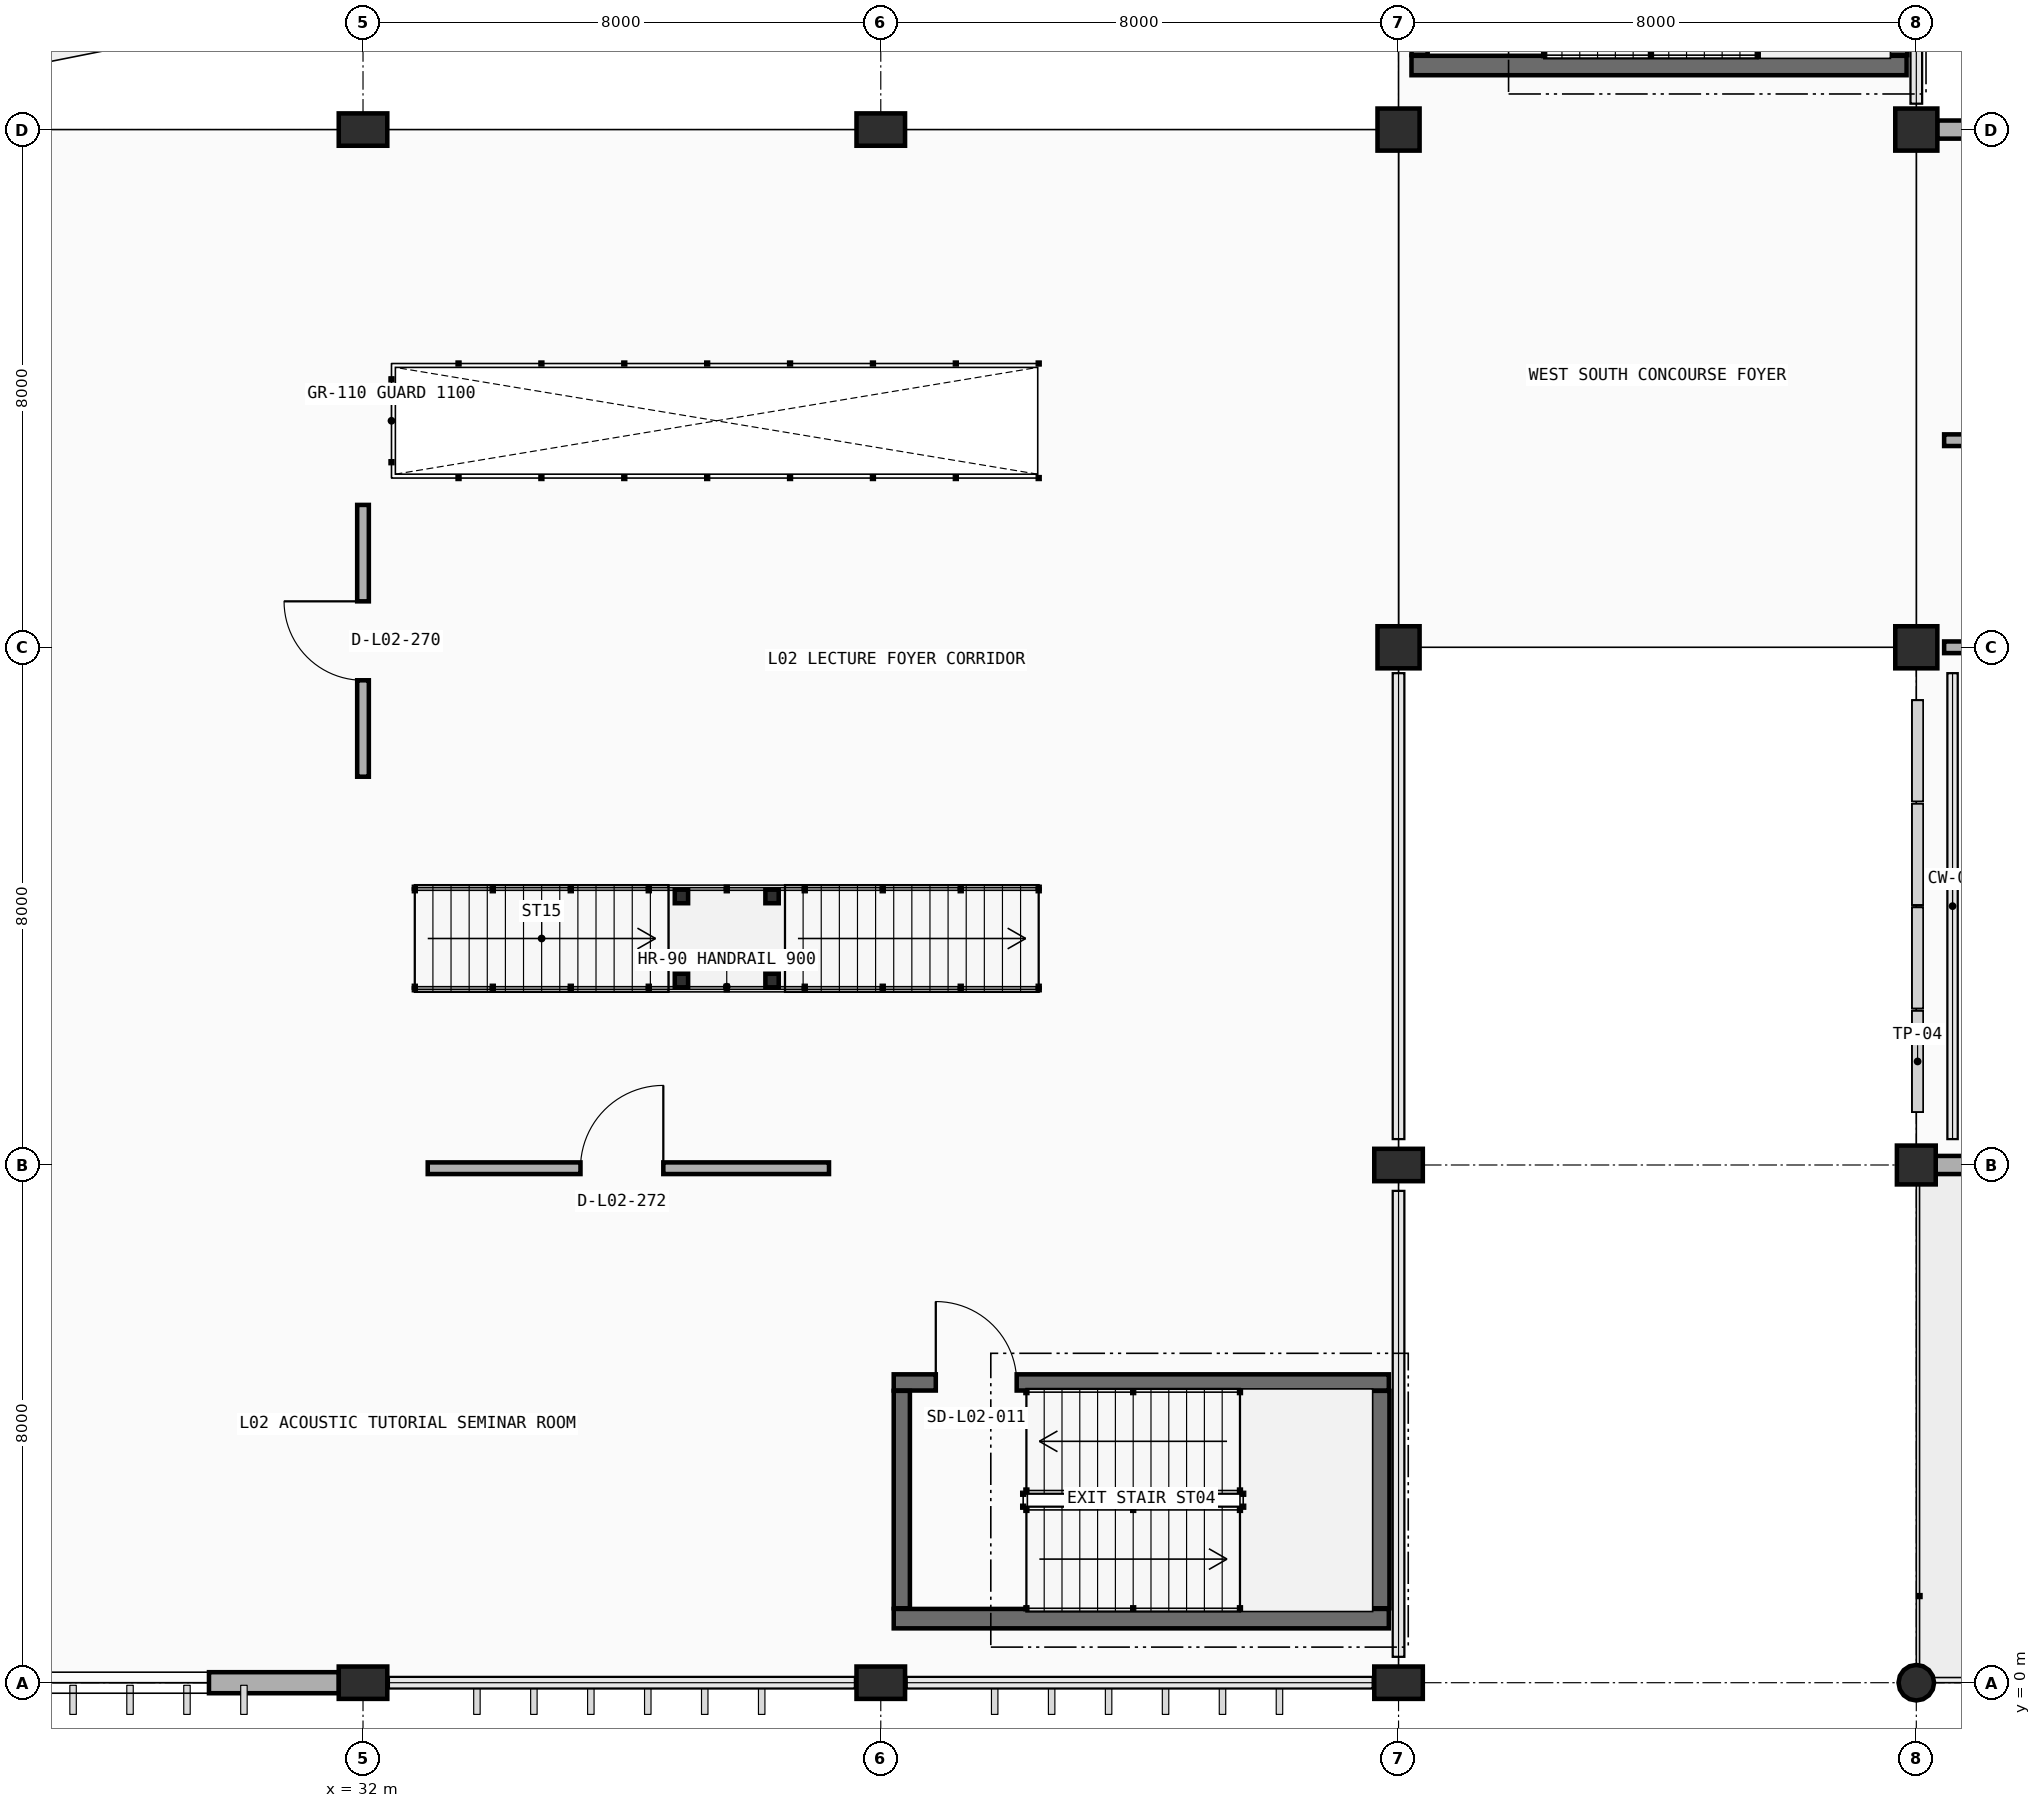
"""IFC4 building model, lengths in metres.
Left out: names, types, materials, properties, quantities, classifications, styles, units other than length and angle.
Written with IfcOpenShell. Run it as: python <this file> out.ifc"""

import sys

from ifc_helpers import new_model, si_unit, direction, frame, frame_2d, origin, origin_2d, place, context, subcontext, project, spatial, rectangle, circle, i_section, extrude, element, fill, save


model = new_model("IFC4")
c1 = context("Model", 3, precision=1e-05, world=origin(), true_north=direction((0.0, 1.0)))
c2 = subcontext(c1, "Body", "Model", "MODEL_VIEW")
j1 = project(units=[si_unit("LENGTHUNIT", "METRE"), si_unit("PLANEANGLEUNIT", "RADIAN")], contexts=[c1])
p1 = place(None, origin())
s1 = spatial("IfcSite", under=j1, at=p1, CompositionType="ELEMENT")
p2 = place(p1, origin())
s2 = spatial("IfcBuilding", under=s1, at=p2, CompositionType="ELEMENT")
p3 = place(p2, frame((0.0, 0.0, 4.8)))
s3 = spatial("IfcBuildingStorey", under=s2, at=p3, CompositionType="ELEMENT", Elevation=4.8)
for number, where, z_axis, x_axis in (
    (1, (32.0, 0.0, 0.0), (0.0, 0.0, 1.0), (0.0, 1.0, 0.0)),
    (2, (40.0, 0.0, 0.0), (0.0, 0.0, 1.0), (0.0, 1.0, 0.0)),
    (3, (48.0, 0.0, 0.0), (0.0, 0.0, 1.0), (0.0, 1.0, 0.0)),
):
    element("IfcColumn", number, at=place(p3, frame(where, z_axis=z_axis, x_axis=x_axis)), inside=s3, PredefinedType="COLUMN", context=c2, shape_type="SweptSolid", body=[
        extrude(rectangle(XDim=0.5, YDim=0.75, at=origin_2d()), origin(), (0.0, 0.0, 1.0), 4.8),
    ])
p4 = place(p3, frame((56.0, 0.0, 0.0), z_axis=(0.0, 0.0, 1.0), x_axis=(1.0, 0.0, 0.0)))
e4 = element("IfcColumn", 4, at=p4, inside=s3, PredefinedType="PILASTER", context=c2, shape_type="SweptSolid", body=[
    extrude(circle(Radius=0.275, at=origin_2d()), origin(), (0.0, 0.0, 1.0), 4.8),
])
p5 = place(p3, frame((48.0, 8.0, 0.0), z_axis=(0.0, 0.0, 1.0), x_axis=(0.0, 1.0, 0.0)))
e5 = element("IfcColumn", 5, at=p5, inside=s3, PredefinedType="COLUMN", context=c2, shape_type="SweptSolid", body=[
    extrude(rectangle(XDim=0.5, YDim=0.75, at=origin_2d()), origin(), (0.0, 0.0, 1.0), 4.8),
])
p6 = place(p3, frame((56.0, 8.0, 0.0), z_axis=(0.0, 0.0, 1.0), x_axis=(1.0, 0.0, 0.0)))
e6 = element("IfcColumn", 6, at=p6, inside=s3, PredefinedType="COLUMN", context=c2, shape_type="SweptSolid", body=[
    extrude(rectangle(XDim=0.6, YDim=0.6, at=origin_2d()), origin(), (0.0, 0.0, 1.0), 4.8),
])
for number, where, z_axis, x_axis in (
    (7, (48.0, 16.0, 0.0), (0.0, 0.0, 1.0), (1.0, 0.0, 0.0)),
    (8, (56.0, 16.0, 0.0), (0.0, 0.0, 1.0), (1.0, 0.0, 0.0)),
):
    element("IfcColumn", number, at=place(p3, frame(where, z_axis=z_axis, x_axis=x_axis)), inside=s3, PredefinedType="COLUMN", context=c2, shape_type="SweptSolid", body=[
        extrude(rectangle(XDim=0.65, YDim=0.65, at=origin_2d()), origin(), (0.0, 0.0, 1.0), 4.8),
    ])
for number, where, z_axis, x_axis in (
    (9, (32.0, 24.0, 0.0), (0.0, 0.0, 1.0), (0.0, 1.0, 0.0)),
    (10, (40.0, 24.0, 0.0), (0.0, 0.0, 1.0), (0.0, 1.0, 0.0)),
):
    element("IfcColumn", number, at=place(p3, frame(where, z_axis=z_axis, x_axis=x_axis)), inside=s3, PredefinedType="COLUMN", context=c2, shape_type="SweptSolid", body=[
        extrude(rectangle(XDim=0.5, YDim=0.75, at=origin_2d()), origin(), (0.0, 0.0, 1.0), 4.8),
    ])
for number, where, z_axis, x_axis in (
    (11, (48.0, 24.0, 0.0), (0.0, 0.0, 1.0), (1.0, 0.0, 0.0)),
    (12, (56.0, 24.0, 0.0), (0.0, 0.0, 1.0), (1.0, 0.0, 0.0)),
):
    element("IfcColumn", number, at=place(p3, frame(where, z_axis=z_axis, x_axis=x_axis)), inside=s3, PredefinedType="COLUMN", context=c2, shape_type="SweptSolid", body=[
        extrude(rectangle(XDim=0.65, YDim=0.65, at=origin_2d()), origin(), (0.0, 0.0, 1.0), 4.8),
    ])
for number, where, z_axis, x_axis in (
    (13, (36.92, 10.85, 0.0), (0.0, 0.0, 1.0), (1.0, 0.0, 0.0)),
    (14, (36.92, 12.15, 0.0), (0.0, 0.0, 1.0), (1.0, 0.0, 0.0)),
    (15, (38.32, 10.85, 0.0), (0.0, 0.0, 1.0), (1.0, 0.0, 0.0)),
    (16, (38.32, 12.15, 0.0), (0.0, 0.0, 1.0), (1.0, 0.0, 0.0)),
):
    element("IfcColumn", number, at=place(p3, frame(where, z_axis=z_axis, x_axis=x_axis)), inside=s3, PredefinedType="COLUMN", context=c2, shape_type="SweptSolid", body=[
        extrude(i_section(OverallWidth=0.206, OverallDepth=0.21, WebThickness=0.01, FlangeThickness=0.014, FilletRadius=0.01, at=origin_2d()), origin(), (0.0, 0.0, 1.0), 2.2),
    ])
p7 = place(p3, frame((63.678, 8.0, 0.0), z_axis=(0.0, 0.0, 1.0), x_axis=(-1.0, 0.0, 0.0)))
e17 = element("IfcWall", 17, at=p7, inside=s3, PredefinedType="STANDARD", context=c2, shape_type="SweptSolid", body=[
    extrude(rectangle(XDim=7.381, YDim=0.28, at=frame_2d((3.69, 0.0))), origin(), (0.0, 0.0, 1.0), 3.91),
])
p8 = place(p7, frame((2.258, 0.0, 0.9)))
e18 = element("IfcOpeningElement", 18, at=p8, cuts=e17, PredefinedType="OPENING", context=c2, shape_type="SweptSolid", body=[
    extrude(rectangle(XDim=1.85, YDim=1.25, at=frame_2d((0.925, 0.625))), frame((0.0, 0.15, 0.0), z_axis=(0.0, -1.0, 0.0), x_axis=(1.0, 0.0, 0.0)), (0.0, 0.0, 1.0), 0.3),
])
p9 = place(p3, frame((56.322, 24.0, 0.0), z_axis=(0.0, 0.0, 1.0), x_axis=(1.0, 0.0, 0.0)))
e19 = element("IfcWall", 19, at=p9, inside=s3, PredefinedType="STANDARD", context=c2, shape_type="SweptSolid", body=[
    extrude(rectangle(XDim=7.356, YDim=0.28, at=frame_2d((3.678, 0.0))), origin(), (0.0, 0.0, 1.0), 3.91),
])
p10 = place(p9, frame((2.258, 0.0, 0.9)))
e20 = element("IfcOpeningElement", 20, at=p10, cuts=e19, PredefinedType="OPENING", context=c2, shape_type="SweptSolid", body=[
    extrude(rectangle(XDim=2.25, YDim=1.25, at=frame_2d((1.125, 0.625))), frame((0.0, 0.15, 0.0), z_axis=(0.0, -1.0, 0.0), x_axis=(1.0, 0.0, 0.0)), (0.0, 0.0, 1.0), 0.3),
])
for number, where, z_axis, x_axis in (
    (21, (56.24, 8.22, 0.0), (0.0, 0.0, 1.0), (1.0, 0.0, 0.0)),
    (22, (56.24, 15.78, 0.0), (0.0, 0.0, 1.0), (1.0, 0.0, 0.0)),
):
    element("IfcWall", number, at=place(p3, frame(where, z_axis=z_axis, x_axis=x_axis)), inside=s3, PredefinedType="PARAPET", context=c2, shape_type="SweptSolid", body=[
        extrude(rectangle(XDim=0.32, YDim=0.2, at=frame_2d((0.16, 0.0))), origin(), (0.0, 0.0, 1.0), 3.95),
    ])
p11 = place(p3, frame((32.331, 26.009, 0.01), z_axis=(0.0, 0.0, 1.0), x_axis=(-0.9807810487, -0.19511159502, 0.0)))
e23 = element("IfcWall", 23, at=p11, inside=s3, PredefinedType="PARAPET", context=c2, shape_type="SweptSolid", body=[
    extrude(rectangle(XDim=6.965, YDim=0.2, at=frame_2d((3.482, 0.0))), origin(), (0.0, 0.0, 1.0), 1.62),
])
p12 = place(p3, frame((31.628, 0.0, 0.0), z_axis=(0.0, 0.0, 1.0), x_axis=(-1.0, 0.0, 0.0)))
e24 = element("IfcWall", 24, at=p12, inside=s3, PredefinedType="STANDARD", context=c2, shape_type="SweptSolid", body=[
    extrude(rectangle(XDim=7.256, YDim=0.325, at=frame_2d((3.628, 0.0))), origin(), (0.0, 0.0, 1.0), 3.89),
])
p13 = place(p12, frame((2.008, 0.0, 0.95)))
e25 = element("IfcOpeningElement", 25, at=p13, cuts=e24, PredefinedType="OPENING", context=c2, shape_type="SweptSolid", body=[
    extrude(rectangle(XDim=3.1, YDim=1.6, at=frame_2d((1.55, 0.8))), frame((0.0, 0.173, 0.0), z_axis=(0.0, -1.0, 0.0), x_axis=(1.0, 0.0, 0.0)), (0.0, 0.0, 1.0), 0.345),
])
p14 = place(p3, frame((48.2, 24.99, 0.0), z_axis=(0.0, 0.0, 1.0), x_axis=(1.0, 0.0, 0.0)))
e26 = element("IfcWall", 26, at=p14, inside=s3, PredefinedType="SHEAR", context=c2, shape_type="SweptSolid", body=[
    extrude(rectangle(XDim=7.65, YDim=0.3, at=frame_2d((3.825, 0.0))), origin(), (0.0, 0.0, 1.0), 4.8),
])
p15 = place(p3, frame((55.71, 25.15, 0.0), z_axis=(0.0, 0.0, 1.0), x_axis=(0.0, 1.0, 0.0)))
e27 = element("IfcWall", 27, at=p15, inside=s3, PredefinedType="SHEAR", context=c2, shape_type="SweptSolid", body=[
    extrude(rectangle(XDim=3.36, YDim=0.3, at=frame_2d((1.68, 0.0))), origin(), (0.0, 0.0, 1.0), 4.8),
])
p16 = place(p3, frame((48.325, 25.15, 0.0), z_axis=(0.0, 0.0, 1.0), x_axis=(0.0, 1.0, 0.0)))
e28 = element("IfcWall", 28, at=p16, inside=s3, PredefinedType="SOLIDWALL", context=c2, shape_type="SweptSolid", body=[
    extrude(rectangle(XDim=3.36, YDim=0.25, at=frame_2d((1.68, 0.0))), origin(), (0.0, 0.0, 1.0), 4.8),
])
p17 = place(p3, frame((40.2, 0.99, 0.0), z_axis=(0.0, 0.0, 1.0), x_axis=(1.0, 0.0, 0.0)))
e29 = element("IfcWall", 29, at=p17, inside=s3, PredefinedType="SHEAR", context=c2, shape_type="SweptSolid", body=[
    extrude(rectangle(XDim=7.65, YDim=0.3, at=frame_2d((3.825, 0.0))), origin(), (0.0, 0.0, 1.0), 4.8),
])
p18 = place(p3, frame((47.71, 1.15, 0.0), z_axis=(0.0, 0.0, 1.0), x_axis=(0.0, 1.0, 0.0)))
e30 = element("IfcWall", 30, at=p18, inside=s3, PredefinedType="SHEAR", context=c2, shape_type="SweptSolid", body=[
    extrude(rectangle(XDim=3.36, YDim=0.3, at=frame_2d((1.68, 0.0))), origin(), (0.0, 0.0, 1.0), 4.8),
])
p19 = place(p3, frame((40.2, 4.64, 0.0), z_axis=(0.0, 0.0, 1.0), x_axis=(1.0, 0.0, 0.0)))
e31 = element("IfcWall", 31, at=p19, inside=s3, PredefinedType="SOLIDWALL", context=c2, shape_type="SweptSolid", body=[
    extrude(rectangle(XDim=7.65, YDim=0.25, at=frame_2d((3.825, 0.0))), origin(), (0.0, 0.0, 1.0), 4.8),
])
p20 = place(p19, frame((0.65, 0.0, 0.0)))
e32 = element("IfcOpeningElement", 32, at=p20, cuts=e31, PredefinedType="OPENING", context=c2, shape_type="SweptSolid", body=[
    extrude(rectangle(XDim=1.25, YDim=2.15, at=frame_2d((0.625, 1.075))), frame((0.0, 0.135, 0.0), z_axis=(0.0, -1.0, 0.0), x_axis=(1.0, 0.0, 0.0)), (0.0, 0.0, 1.0), 0.27),
])
p21 = place(p3, frame((40.325, 1.15, 0.0), z_axis=(0.0, 0.0, 1.0), x_axis=(0.0, 1.0, 0.0)))
e33 = element("IfcWall", 33, at=p21, inside=s3, PredefinedType="SOLIDWALL", context=c2, shape_type="SweptSolid", body=[
    extrude(rectangle(XDim=3.36, YDim=0.25, at=frame_2d((1.68, 0.0))), origin(), (0.0, 0.0, 1.0), 4.8),
])
p22 = place(p3, frame((56.43, 16.0, 0.0), z_axis=(0.0, 0.0, 1.0), x_axis=(1.0, 0.0, 0.0)))
e34 = element("IfcWall", 34, at=p22, inside=s3, PredefinedType="PARTITIONING", context=c2, shape_type="SweptSolid", body=[
    extrude(rectangle(XDim=23.14, YDim=0.18, at=frame_2d((11.57, 0.0))), origin(), (0.0, 0.0, 1.0), 3.86),
])
p23 = place(p22, frame((3.06, 0.0, 0.0)))
e35 = element("IfcOpeningElement", 35, at=p23, cuts=e34, PredefinedType="OPENING", context=c2, shape_type="SweptSolid", body=[
    extrude(rectangle(XDim=1.02, YDim=2.1, at=frame_2d((0.51, 1.05))), frame((0.0, 0.1, 0.0), z_axis=(0.0, -1.0, 0.0), x_axis=(1.0, 0.0, 0.0)), (0.0, 0.0, 1.0), 0.2),
])
p24 = place(p3, frame((56.43, 19.2, 0.0), z_axis=(0.0, 0.0, 1.0), x_axis=(1.0, 0.0, 0.0)))
e36 = element("IfcWall", 36, at=p24, inside=s3, PredefinedType="PARTITIONING", context=c2, shape_type="SweptSolid", body=[
    extrude(rectangle(XDim=15.14, YDim=0.18, at=frame_2d((7.57, 0.0))), origin(), (0.0, 0.0, 1.0), 3.9),
])
p25 = place(p24, frame((3.03, 0.0, 0.0)))
e37 = element("IfcOpeningElement", 37, at=p25, cuts=e36, PredefinedType="OPENING", context=c2, shape_type="SweptSolid", body=[
    extrude(rectangle(XDim=1.08, YDim=2.15, at=frame_2d((0.54, 1.075))), frame((0.0, 0.1, 0.0), z_axis=(0.0, -1.0, 0.0), x_axis=(1.0, 0.0, 0.0)), (0.0, 0.0, 1.0), 0.2),
])
p26 = place(p3, frame((32.0, 14.0, 0.0), z_axis=(0.0, 0.0, 1.0), x_axis=(0.0, 1.0, 0.0)))
e38 = element("IfcWall", 38, at=p26, inside=s3, PredefinedType="PARTITIONING", context=c2, shape_type="SweptSolid", body=[
    extrude(rectangle(XDim=4.2, YDim=0.18, at=frame_2d((2.1, 0.0))), origin(), (0.0, 0.0, 1.0), 3.655),
])
p27 = place(p26, frame((1.49, 0.0, 0.0)))
e39 = element("IfcOpeningElement", 39, at=p27, cuts=e38, PredefinedType="OPENING", context=c2, shape_type="SweptSolid", body=[
    extrude(rectangle(XDim=1.22, YDim=2.18, at=frame_2d((0.61, 1.09))), frame((0.0, 0.1, 0.0), z_axis=(0.0, -1.0, 0.0), x_axis=(1.0, 0.0, 0.0)), (0.0, 0.0, 1.0), 0.2),
])
p28 = place(p3, frame((33.0, 7.95, 0.0), z_axis=(0.0, 0.0, 1.0), x_axis=(1.0, 0.0, 0.0)))
e40 = element("IfcWall", 40, at=p28, inside=s3, PredefinedType="PARTITIONING", context=c2, shape_type="SweptSolid", body=[
    extrude(rectangle(XDim=6.2, YDim=0.18, at=frame_2d((3.1, 0.0))), origin(), (0.0, 0.0, 1.0), 3.9),
])
p29 = place(p28, frame((2.36, 0.0, 0.0)))
e41 = element("IfcOpeningElement", 41, at=p29, cuts=e40, PredefinedType="OPENING", context=c2, shape_type="SweptSolid", body=[
    extrude(rectangle(XDim=1.28, YDim=2.2, at=frame_2d((0.64, 1.1))), frame((0.0, 0.1, 0.0), z_axis=(0.0, -1.0, 0.0), x_axis=(1.0, 0.0, 0.0)), (0.0, 0.0, 1.0), 0.2),
])
p30 = place(p13, origin())
e42 = element("IfcWindow", 42, at=p30, inside=s3, PartitioningType="DOUBLE_PANEL_VERTICAL", PredefinedType="WINDOW", context=c2, shape_type="SweptSolid", body=[
    extrude(rectangle(XDim=3.1, YDim=1.6, at=frame_2d((1.55, 0.8))), frame((0.0, 0.03, 0.0), z_axis=(0.0, -1.0, 0.0), x_axis=(1.0, 0.0, 0.0)), (0.0, 0.0, 1.0), 0.06),
])
fill(e25, e42)
p31 = place(p20, origin())
e43 = element("IfcDoor", 43, at=p31, inside=s3, OperationType="SINGLE_SWING_LEFT", PredefinedType="DOOR", context=c2, shape_type="SweptSolid", body=[
    extrude(rectangle(XDim=1.25, YDim=2.15, at=frame_2d((0.625, 1.075))), frame((0.0, 0.025, 0.0), z_axis=(0.0, -1.0, 0.0), x_axis=(1.0, 0.0, 0.0)), (0.0, 0.0, 1.0), 0.05),
])
fill(e32, e43)
p32 = place(p27, origin())
e44 = element("IfcDoor", 44, at=p32, inside=s3, OperationType="SINGLE_SWING_RIGHT", PredefinedType="DOOR", context=c2, shape_type="SweptSolid", body=[
    extrude(rectangle(XDim=1.22, YDim=2.18, at=frame_2d((0.61, 1.09))), frame((0.0, 0.025, 0.0), z_axis=(0.0, -1.0, 0.0), x_axis=(1.0, 0.0, 0.0)), (0.0, 0.0, 1.0), 0.05),
])
fill(e39, e44)
p33 = place(p29, origin())
e45 = element("IfcDoor", 45, at=p33, inside=s3, OperationType="SINGLE_SWING_RIGHT", PredefinedType="DOOR", context=c2, shape_type="SweptSolid", body=[
    extrude(rectangle(XDim=1.28, YDim=2.2, at=frame_2d((0.64, 1.1))), frame((0.0, 0.025, 0.0), z_axis=(0.0, -1.0, 0.0), x_axis=(1.0, 0.0, 0.0)), (0.0, 0.0, 1.0), 0.05),
])
fill(e41, e45)
save(model, sys.argv[1])
